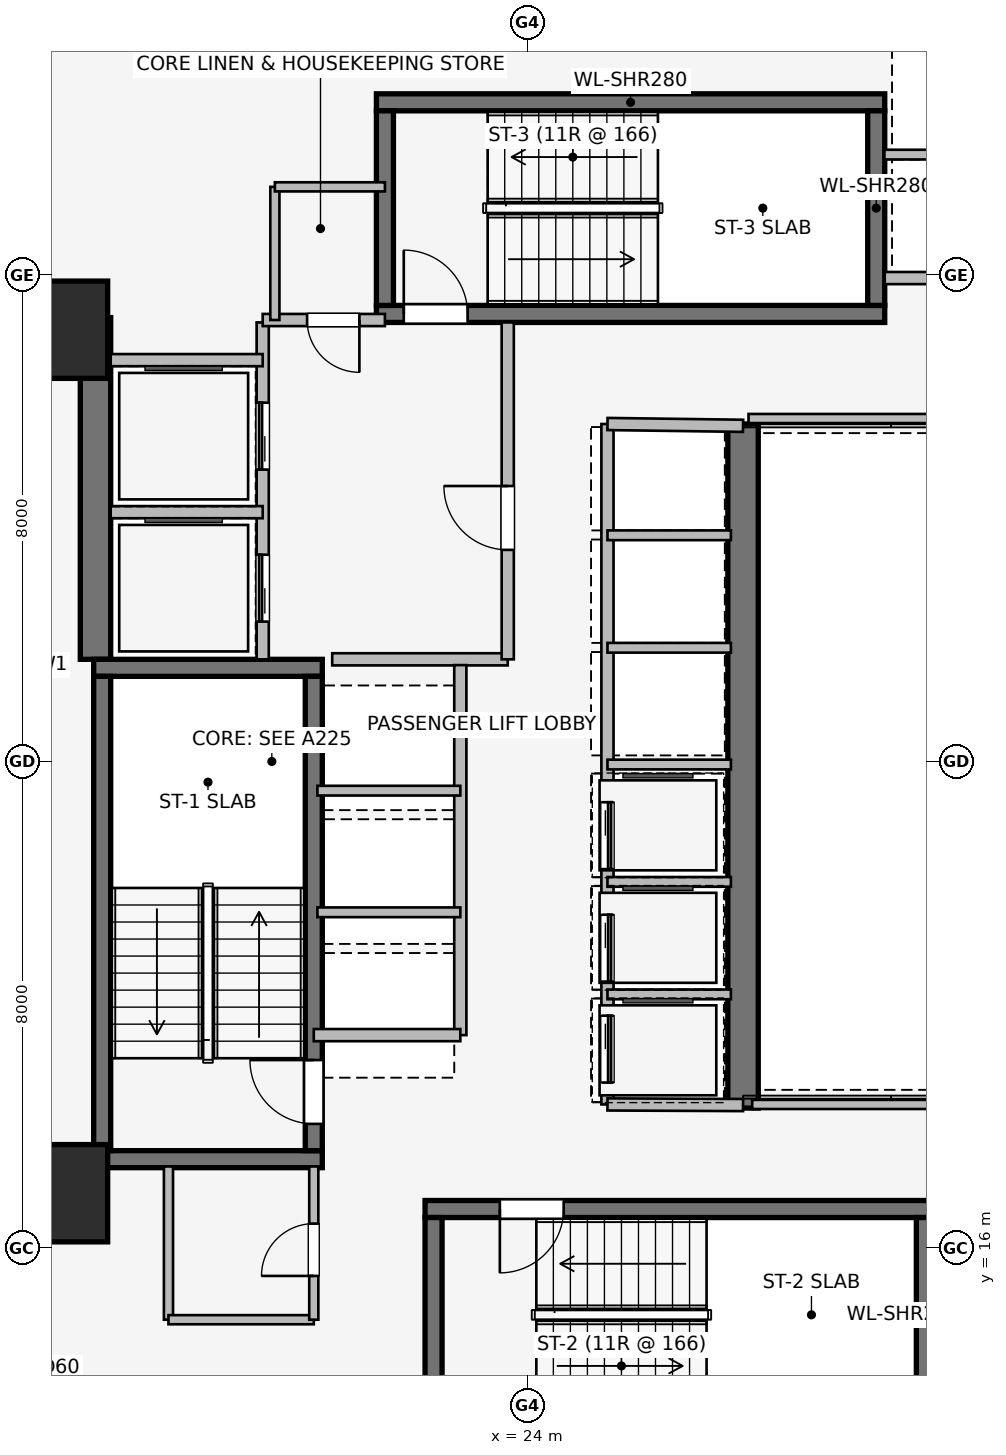
"""IFC4 building model, lengths in metres.
Left out: names, types, materials, properties, quantities, classifications, styles, units other than length and angle.
Written with IfcOpenShell. Run it as: python <this file> out.ifc"""

import sys

from ifc_helpers import new_model, si_unit, direction, frame, frame_2d, origin, origin_2d, place, context, subcontext, project, spatial, rectangle, extrude, element, fill, save


model = new_model("IFC4")
c1 = context("Model", 3, precision=1e-05, world=origin(), true_north=direction((0.0, 1.0)))
c2 = subcontext(c1, "Body", "Model", "MODEL_VIEW")
j1 = project(units=[si_unit("LENGTHUNIT", "METRE"), si_unit("PLANEANGLEUNIT", "RADIAN")], contexts=[c1])
p1 = place(None, origin())
s1 = spatial("IfcSite", under=j1, at=p1, CompositionType="ELEMENT")
p2 = place(p1, origin())
s2 = spatial("IfcBuilding", under=s1, at=p2, CompositionType="ELEMENT")
p3 = place(p2, frame((0.0, 0.0, 89.05)))
s3 = spatial("IfcBuildingStorey", under=s2, at=p3, CompositionType="ELEMENT", Elevation=89.05)
p4 = place(p3, frame((16.9, 25.68, 0.0), z_axis=(0.0, 0.0, 1.0), x_axis=(0.0, 1.0, 0.0)))
e1 = element("IfcWall", 1, at=p4, inside=s3, PredefinedType="SHEAR", context=c2, shape_type="SweptSolid", body=[
    extrude(rectangle(XDim=5.62, YDim=0.5, at=frame_2d((2.81, 0.0))), origin(), (0.0, 0.0, 1.0), 3.65),
])
p5 = place(p3, frame((27.55, 29.55, 0.0), z_axis=(0.0, 0.0, 1.0), x_axis=(0.0, -1.0, 0.0)))
e2 = element("IfcWall", 2, at=p5, inside=s3, PredefinedType="SHEAR", context=c2, shape_type="SweptSolid", body=[
    extrude(rectangle(XDim=11.25, YDim=0.5, at=frame_2d((5.625, 0.0))), origin(), (0.0, 0.0, 1.0), 3.65),
])
for number, where, z_axis, x_axis in (
    (3, (16.87, 17.46, 0.0), (0.0, 0.0, 1.0), (1.0, 0.0, 0.0)),
    (4, (20.63, 25.54, 0.0), (0.0, 0.0, 1.0), (-1.0, 0.0, 0.0)),
):
    element("IfcWall", number, at=place(p3, frame(where, z_axis=z_axis, x_axis=x_axis)), inside=s3, PredefinedType="SHEAR", context=c2, shape_type="SweptSolid", body=[
        extrude(rectangle(XDim=3.76, YDim=0.28, at=frame_2d((1.88, 0.0))), origin(), (0.0, 0.0, 1.0), 3.65),
    ])
p6 = place(p3, frame((17.01, 25.4, 0.0), z_axis=(0.0, 0.0, 1.0), x_axis=(0.0, -1.0, 0.0)))
e5 = element("IfcWall", 5, at=p6, inside=s3, PredefinedType="SHEAR", context=c2, shape_type="SweptSolid", body=[
    extrude(rectangle(XDim=7.8, YDim=0.28, at=frame_2d((3.9, 0.0))), origin(), (0.0, 0.0, 1.0), 3.65),
])
p7 = place(p3, frame((20.49, 17.6, 0.0), z_axis=(0.0, 0.0, 1.0), x_axis=(0.0, 1.0, 0.0)))
e6 = element("IfcWall", 6, at=p7, inside=s3, PredefinedType="SHEAR", context=c2, shape_type="SweptSolid", body=[
    extrude(rectangle(XDim=7.8, YDim=0.28, at=frame_2d((3.9, 0.0))), origin(), (0.0, 0.0, 1.0), 3.65),
])
p8 = place(p7, frame((0.44, 0.0, 0.0)))
e7 = element("IfcOpeningElement", 7, at=p8, cuts=e6, PredefinedType="OPENING", context=c2, shape_type="SweptSolid", body=[
    extrude(rectangle(XDim=1.05, YDim=2.0, at=frame_2d((0.525, 1.0))), frame((0.0, 0.15, 0.0), z_axis=(0.0, -1.0, 0.0), x_axis=(1.0, 0.0, 0.0)), (0.0, 0.0, 1.0), 0.3),
])
p9 = place(p3, frame((30.68, 16.64, 0.0), z_axis=(0.0, 0.0, 1.0), x_axis=(-1.0, 0.0, 0.0)))
e8 = element("IfcWall", 8, at=p9, inside=s3, PredefinedType="SHEAR", context=c2, shape_type="SweptSolid", body=[
    extrude(rectangle(XDim=8.36, YDim=0.28, at=frame_2d((4.18, 0.0))), origin(), (0.0, 0.0, 1.0), 3.65),
])
p10 = place(p9, frame((6.08, 0.0, 0.0)))
e9 = element("IfcOpeningElement", 9, at=p10, cuts=e8, PredefinedType="OPENING", context=c2, shape_type="SweptSolid", body=[
    extrude(rectangle(XDim=1.05, YDim=2.0, at=frame_2d((0.525, 1.0))), frame((0.0, 0.15, 0.0), z_axis=(0.0, -1.0, 0.0), x_axis=(1.0, 0.0, 0.0)), (0.0, 0.0, 1.0), 0.3),
])
for number, where, z_axis, x_axis in (
    (10, (22.46, 16.5, 0.0), (0.0, 0.0, 1.0), (0.0, -1.0, 0.0)),
    (11, (30.54, 13.3, 0.0), (0.0, 0.0, 1.0), (0.0, 1.0, 0.0)),
):
    element("IfcWall", number, at=place(p3, frame(where, z_axis=z_axis, x_axis=x_axis)), inside=s3, PredefinedType="SHEAR", context=c2, shape_type="SweptSolid", body=[
        extrude(rectangle(XDim=3.2, YDim=0.28, at=frame_2d((1.6, 0.0))), origin(), (0.0, 0.0, 1.0), 3.65),
    ])
p11 = place(p3, frame((21.52, 31.36, 0.0), z_axis=(0.0, 0.0, 1.0), x_axis=(1.0, 0.0, 0.0)))
e12 = element("IfcWall", 12, at=p11, inside=s3, PredefinedType="SHEAR", context=c2, shape_type="SweptSolid", body=[
    extrude(rectangle(XDim=8.36, YDim=0.28, at=frame_2d((4.18, 0.0))), origin(), (0.0, 0.0, 1.0), 3.65),
])
p12 = place(p11, frame((0.45, 0.0, 0.0)))
e13 = element("IfcOpeningElement", 13, at=p12, cuts=e12, PredefinedType="OPENING", context=c2, shape_type="SweptSolid", body=[
    extrude(rectangle(XDim=1.05, YDim=2.0, at=frame_2d((0.525, 1.0))), frame((0.0, 0.15, 0.0), z_axis=(0.0, -1.0, 0.0), x_axis=(1.0, 0.0, 0.0)), (0.0, 0.0, 1.0), 0.3),
])
p13 = place(p3, frame((29.88, 34.84, 0.0), z_axis=(0.0, 0.0, 1.0), x_axis=(-1.0, 0.0, 0.0)))
e14 = element("IfcWall", 14, at=p13, inside=s3, PredefinedType="SHEAR", context=c2, shape_type="SweptSolid", body=[
    extrude(rectangle(XDim=8.36, YDim=0.28, at=frame_2d((4.18, 0.0))), origin(), (0.0, 0.0, 1.0), 3.65),
])
for number, where, z_axis, x_axis in (
    (15, (21.66, 34.7, 0.0), (0.0, 0.0, 1.0), (0.0, -1.0, 0.0)),
    (16, (29.74, 31.5, 0.0), (0.0, 0.0, 1.0), (0.0, 1.0, 0.0)),
):
    element("IfcWall", number, at=place(p3, frame(where, z_axis=z_axis, x_axis=x_axis)), inside=s3, PredefinedType="SHEAR", context=c2, shape_type="SweptSolid", body=[
        extrude(rectangle(XDim=3.2, YDim=0.28, at=frame_2d((1.6, 0.0))), origin(), (0.0, 0.0, 1.0), 3.65),
    ])
for number, where, z_axis, x_axis in (
    (17, (16.3, 16.9, 0.0), (0.0, 0.0, 1.0), (1.0, 0.0, 0.0)),
    (18, (16.3, 31.1, 0.0), (0.0, 0.0, 1.0), (1.0, 0.0, 0.0)),
):
    element("IfcColumn", number, at=place(p3, frame(where, z_axis=z_axis, x_axis=x_axis)), inside=s3, PredefinedType="COLUMN", context=c2, shape_type="SweptSolid", body=[
        extrude(rectangle(XDim=1.6, YDim=1.6, at=origin_2d()), origin(), (0.0, 0.0, 1.0), 3.65),
    ])
p14 = place(p3, frame((19.65, 25.68, 0.0), z_axis=(0.0, 0.0, 1.0), x_axis=(0.0, 1.0, 0.0)))
e19 = element("IfcWall", 19, at=p14, inside=s3, PredefinedType="PARTITIONING", context=c2, shape_type="SweptSolid", body=[
    extrude(rectangle(XDim=5.54, YDim=0.2, at=frame_2d((2.77, 0.0))), origin(), (0.0, 0.0, 1.0), 3.39),
])
p15 = place(p14, frame((0.62, 0.0, 0.0)))
e20 = element("IfcOpeningElement", 20, at=p15, cuts=e19, PredefinedType="OPENING", context=c2, shape_type="SweptSolid", body=[
    extrude(rectangle(XDim=1.1, YDim=2.2, at=frame_2d((0.55, 1.1))), frame((0.0, 0.11, 0.0), z_axis=(0.0, -1.0, 0.0), x_axis=(1.0, 0.0, 0.0)), (0.0, 0.0, 1.0), 0.22),
])
p16 = place(p14, frame((3.12, 0.0, 0.0)))
e21 = element("IfcOpeningElement", 21, at=p16, cuts=e19, PredefinedType="OPENING", context=c2, shape_type="SweptSolid", body=[
    extrude(rectangle(XDim=1.1, YDim=2.2, at=frame_2d((0.55, 1.1))), frame((0.0, 0.11, 0.0), z_axis=(0.0, -1.0, 0.0), x_axis=(1.0, 0.0, 0.0)), (0.0, 0.0, 1.0), 0.22),
])
p17 = place(p3, frame((20.793, 25.68, 0.0), z_axis=(0.0, 0.0, 1.0), x_axis=(1.0, 0.0, 0.0)))
e22 = element("IfcWall", 22, at=p17, inside=s3, PredefinedType="PARTITIONING", context=c2, shape_type="SweptSolid", body=[
    extrude(rectangle(XDim=2.887, YDim=0.2, at=frame_2d((1.443, 0.0))), origin(), (0.0, 0.0, 1.0), 3.39),
])
p18 = place(p3, frame((23.68, 25.68, 0.0), z_axis=(0.0, 0.0, 1.0), x_axis=(0.0, 1.0, 0.0)))
e23 = element("IfcWall", 23, at=p18, inside=s3, PredefinedType="PARTITIONING", context=c2, shape_type="SweptSolid", body=[
    extrude(rectangle(XDim=5.54, YDim=0.2, at=frame_2d((2.77, 0.0))), origin(), (0.0, 0.0, 1.0), 3.39),
])
p19 = place(p18, frame((1.8, 0.0, 0.0)))
e24 = element("IfcOpeningElement", 24, at=p19, cuts=e23, PredefinedType="OPENING", context=c2, shape_type="SweptSolid", body=[
    extrude(rectangle(XDim=1.05, YDim=2.0, at=frame_2d((0.525, 1.0))), frame((0.0, 0.11, 0.0), z_axis=(0.0, -1.0, 0.0), x_axis=(1.0, 0.0, 0.0)), (0.0, 0.0, 1.0), 0.22),
])
p20 = place(p3, frame((21.66, 31.26, 0.0), z_axis=(0.0, 0.0, 1.0), x_axis=(-1.0, 0.0, 0.0)))
e25 = element("IfcWall", 25, at=p20, inside=s3, PredefinedType="PARTITIONING", context=c2, shape_type="SweptSolid", body=[
    extrude(rectangle(XDim=2.01, YDim=0.2, at=frame_2d((1.005, 0.0))), origin(), (0.0, 0.0, 1.0), 3.39),
])
p21 = place(p20, frame((0.42, 0.0, 0.0)))
e26 = element("IfcOpeningElement", 26, at=p21, cuts=e25, PredefinedType="OPENING", context=c2, shape_type="SweptSolid", body=[
    extrude(rectangle(XDim=0.86, YDim=2.0, at=frame_2d((0.43, 1.0))), frame((0.0, 0.11, 0.0), z_axis=(0.0, -1.0, 0.0), x_axis=(1.0, 0.0, 0.0)), (0.0, 0.0, 1.0), 0.22),
])
p22 = place(p3, frame((17.15, 28.1, 0.0), z_axis=(0.0, 0.0, 1.0), x_axis=(1.0, 0.0, 0.0)))
e27 = element("IfcWall", 27, at=p22, inside=s3, PredefinedType="PARTITIONING", context=c2, shape_type="SweptSolid", body=[
    extrude(rectangle(XDim=2.5, YDim=0.2, at=frame_2d((1.25, 0.0))), origin(), (0.0, 0.0, 1.0), 3.39),
])
p23 = place(p3, frame((19.65, 30.6, 0.0), z_axis=(0.0, 0.0, 1.0), x_axis=(-1.0, 0.0, 0.0)))
e28 = element("IfcWall", 28, at=p23, inside=s3, PredefinedType="PARTITIONING", context=c2, shape_type="SweptSolid", body=[
    extrude(rectangle(XDim=2.5, YDim=0.2, at=frame_2d((1.25, 0.0))), origin(), (0.0, 0.0, 1.0), 2.29),
])
p24 = place(p3, frame((32.48, 31.95, 0.0), z_axis=(0.0, 0.0, 1.0), x_axis=(-1.0, 0.0, 0.0)))
e29 = element("IfcWall", 29, at=p24, inside=s3, PredefinedType="PARTITIONING", context=c2, shape_type="SweptSolid", body=[
    extrude(rectangle(XDim=2.6, YDim=0.2, at=frame_2d((1.3, 0.0))), origin(), (0.0, 0.0, 1.0), 3.39),
])
p25 = place(p3, frame((29.875, 33.98, 0.0), z_axis=(0.0, 0.0, 1.0), x_axis=(1.0, 0.0, 0.0)))
e30 = element("IfcWall", 30, at=p25, inside=s3, PredefinedType="PARTITIONING", context=c2, shape_type="SweptSolid", body=[
    extrude(rectangle(XDim=2.605, YDim=0.16, at=frame_2d((1.302, 0.0))), origin(), (0.0, 0.0, 1.0), 3.39),
])
p26 = place(p3, frame((22.9, 19.5, 0.0), z_axis=(0.0, 0.0, 1.0), x_axis=(0.0, 1.0, 0.0)))
e31 = element("IfcWall", 31, at=p26, inside=s3, PredefinedType="PARTITIONING", context=c2, shape_type="SweptSolid", body=[
    extrude(rectangle(XDim=6.085, YDim=0.2, at=frame_2d((3.042, 0.0))), origin(), (0.0, 0.0, 1.0), 3.39),
])
p27 = place(p3, frame((20.49, 19.5, 0.0), z_axis=(0.0, 0.0, 1.0), x_axis=(1.0, 0.0, 0.0)))
e32 = element("IfcWall", 32, at=p27, inside=s3, PredefinedType="PARTITIONING", context=c2, shape_type="SweptSolid", body=[
    extrude(rectangle(XDim=2.41, YDim=0.2, at=frame_2d((1.205, 0.0))), origin(), (0.0, 0.0, 1.0), 2.29),
])
for number, where, z_axis, x_axis in (
    (33, (20.55, 21.52, 0.0), (0.0, 0.0, 1.0), (1.0, 0.0, 0.0)),
    (34, (20.55, 23.52, 0.0), (0.0, 0.0, 1.0), (1.0, 0.0, 0.0)),
):
    element("IfcWall", number, at=place(p3, frame(where, z_axis=z_axis, x_axis=x_axis)), inside=s3, PredefinedType="PARTITIONING", context=c2, shape_type="SweptSolid", body=[
        extrude(rectangle(XDim=2.35, YDim=0.16, at=frame_2d((1.175, 0.0))), origin(), (0.0, 0.0, 1.0), 3.39),
    ])
p28 = place(p3, frame((25.32, 29.55, 0.0), z_axis=(0.0, 0.0, 1.0), x_axis=(0.0, -1.0, 0.0)))
e35 = element("IfcWall", 35, at=p28, inside=s3, PredefinedType="PARTITIONING", context=c2, shape_type="SweptSolid", body=[
    extrude(rectangle(XDim=11.19, YDim=0.2, at=frame_2d((5.595, 0.0))), origin(), (0.0, 0.0, 1.0), 3.39),
])
p29 = place(p28, frame((6.22, 0.0, 0.0)))
e36 = element("IfcOpeningElement", 36, at=p29, cuts=e35, PredefinedType="OPENING", context=c2, shape_type="SweptSolid", body=[
    extrude(rectangle(XDim=1.1, YDim=2.2, at=frame_2d((0.55, 1.1))), frame((0.0, 0.11, 0.0), z_axis=(0.0, -1.0, 0.0), x_axis=(1.0, 0.0, 0.0)), (0.0, 0.0, 1.0), 0.22),
])
p30 = place(p28, frame((8.07, 0.0, 0.0)))
e37 = element("IfcOpeningElement", 37, at=p30, cuts=e35, PredefinedType="OPENING", context=c2, shape_type="SweptSolid", body=[
    extrude(rectangle(XDim=1.1, YDim=2.2, at=frame_2d((0.55, 1.1))), frame((0.0, 0.11, 0.0), z_axis=(0.0, -1.0, 0.0), x_axis=(1.0, 0.0, 0.0)), (0.0, 0.0, 1.0), 0.22),
])
p31 = place(p28, frame((9.73, 0.0, 0.0)))
e38 = element("IfcOpeningElement", 38, at=p31, cuts=e35, PredefinedType="OPENING", context=c2, shape_type="SweptSolid", body=[
    extrude(rectangle(XDim=1.1, YDim=2.2, at=frame_2d((0.55, 1.1))), frame((0.0, 0.11, 0.0), z_axis=(0.0, -1.0, 0.0), x_axis=(1.0, 0.0, 0.0)), (0.0, 0.0, 1.0), 0.22),
])
p32 = place(p3, frame((25.32, 18.36, 0.0), z_axis=(0.0, 0.0, 1.0), x_axis=(0.999989925833, -0.004488678231, 0.0)))
e39 = element("IfcWall", 39, at=p32, inside=s3, PredefinedType="PARTITIONING", context=c2, shape_type="SweptSolid", body=[
    extrude(rectangle(XDim=2.23, YDim=0.2, at=frame_2d((1.115, 0.0))), origin(), (0.0, 0.0, 1.0), 3.39),
])
p33 = place(p3, frame((27.55, 29.52, 0.0), z_axis=(0.0, 0.0, 1.0), x_axis=(-0.999909343457, 0.013464949556, 0.0)))
e40 = element("IfcWall", 40, at=p33, inside=s3, PredefinedType="PARTITIONING", context=c2, shape_type="SweptSolid", body=[
    extrude(rectangle(XDim=2.23, YDim=0.2, at=frame_2d((1.115, 0.0))), origin(), (0.0, 0.0, 1.0), 2.29),
])
for number, where, z_axis, x_axis in (
    (41, (25.32, 20.17, 0.0), (0.0, 0.0, 1.0), (1.0, 0.0, 0.0)),
    (42, (25.32, 22.02, 0.0), (0.0, 0.0, 1.0), (1.0, 0.0, 0.0)),
    (43, (25.32, 23.95, 0.0), (0.0, 0.0, 1.0), (1.0, 0.0, 0.0)),
    (44, (25.32, 25.87, 0.0), (0.0, 0.0, 1.0), (1.0, 0.0, 0.0)),
    (45, (25.32, 27.72, 0.0), (0.0, 0.0, 1.0), (1.0, 0.0, 0.0)),
):
    element("IfcWall", number, at=place(p3, frame(where, z_axis=z_axis, x_axis=x_axis)), inside=s3, PredefinedType="PARTITIONING", context=c2, shape_type="SweptSolid", body=[
        extrude(rectangle(XDim=2.03, YDim=0.16, at=frame_2d((1.015, 0.0))), origin(), (0.0, 0.0, 1.0), 3.39),
    ])
p34 = place(p3, frame((18.1, 17.34, 0.0), z_axis=(0.0, 0.0, 1.0), x_axis=(0.0, -1.0, 0.0)))
e46 = element("IfcWall", 46, at=p34, inside=s3, PredefinedType="PARTITIONING", context=c2, shape_type="SweptSolid", body=[
    extrude(rectangle(XDim=2.52, YDim=0.15, at=frame_2d((1.26, 0.0))), origin(), (0.0, 0.0, 1.0), 3.39),
])
p35 = place(p3, frame((18.1, 14.82, 0.0), z_axis=(0.0, 0.0, 1.0), x_axis=(1.0, 0.0, 0.0)))
e47 = element("IfcWall", 47, at=p35, inside=s3, PredefinedType="PARTITIONING", context=c2, shape_type="SweptSolid", body=[
    extrude(rectangle(XDim=2.39, YDim=0.15, at=frame_2d((1.195, 0.0))), origin(), (0.0, 0.0, 1.0), 3.39),
])
p36 = place(p3, frame((20.49, 14.82, 0.0), z_axis=(0.0, 0.0, 1.0), x_axis=(0.0, 1.0, 0.0)))
e48 = element("IfcWall", 48, at=p36, inside=s3, PredefinedType="PARTITIONING", context=c2, shape_type="SweptSolid", body=[
    extrude(rectangle(XDim=2.52, YDim=0.15, at=frame_2d((1.26, 0.0))), origin(), (0.0, 0.0, 1.0), 3.39),
])
p37 = place(p36, frame((0.72, 0.0, 0.0)))
e49 = element("IfcOpeningElement", 49, at=p37, cuts=e48, PredefinedType="OPENING", context=c2, shape_type="SweptSolid", body=[
    extrude(rectangle(XDim=0.86, YDim=2.0, at=frame_2d((0.43, 1.0))), frame((0.0, 0.085, 0.0), z_axis=(0.0, -1.0, 0.0), x_axis=(1.0, 0.0, 0.0)), (0.0, 0.0, 1.0), 0.17),
])
p38 = place(p3, frame((19.85, 33.45, 0.0), z_axis=(0.0, 0.0, 1.0), x_axis=(0.0, -1.0, 0.0)))
e50 = element("IfcWall", 50, at=p38, inside=s3, PredefinedType="PARTITIONING", context=c2, shape_type="SweptSolid", body=[
    extrude(rectangle(XDim=2.19, YDim=0.15, at=frame_2d((1.095, 0.0))), origin(), (0.0, 0.0, 1.0), 3.39),
])
p39 = place(p3, frame((21.66, 33.45, 0.0), z_axis=(0.0, 0.0, 1.0), x_axis=(-1.0, 0.0, 0.0)))
e51 = element("IfcWall", 51, at=p39, inside=s3, PredefinedType="PARTITIONING", context=c2, shape_type="SweptSolid", body=[
    extrude(rectangle(XDim=1.81, YDim=0.15, at=frame_2d((0.905, 0.0))), origin(), (0.0, 0.0, 1.0), 3.39),
])
p40 = place(p3, frame((27.7, 18.36, 0.0), z_axis=(0.0, 0.0, 1.0), x_axis=(1.0, 0.0, 0.0)))
e52 = element("IfcWall", 52, at=p40, inside=s3, PredefinedType="PARTITIONING", context=c2, shape_type="SweptSolid", body=[
    extrude(rectangle(XDim=12.14, YDim=0.15, at=frame_2d((6.07, 0.0))), origin(), (0.0, 0.0, 1.0), 2.531),
])
p41 = place(p3, frame((39.84, 29.64, 0.0), z_axis=(0.0, 0.0, 1.0), x_axis=(-1.0, 0.0, 0.0)))
e53 = element("IfcWall", 53, at=p41, inside=s3, PredefinedType="PARTITIONING", context=c2, shape_type="SweptSolid", body=[
    extrude(rectangle(XDim=12.2, YDim=0.15, at=frame_2d((6.1, 0.0))), origin(), (0.0, 0.0, 1.0), 2.531),
])
p42 = place(p8, origin())
e54 = element("IfcDoor", 54, at=p42, inside=s3, OperationType="SINGLE_SWING_RIGHT", PredefinedType="DOOR", context=c2, shape_type="SweptSolid", body=[
    extrude(rectangle(XDim=1.05, YDim=2.0, at=frame_2d((0.525, 1.0))), frame((0.0, 0.025, 0.0), z_axis=(0.0, -1.0, 0.0), x_axis=(1.0, 0.0, 0.0)), (0.0, 0.0, 1.0), 0.05),
])
fill(e7, e54)
p43 = place(p10, origin())
e55 = element("IfcDoor", 55, at=p43, inside=s3, OperationType="SINGLE_SWING_RIGHT", PredefinedType="DOOR", context=c2, shape_type="SweptSolid", body=[
    extrude(rectangle(XDim=1.05, YDim=2.0, at=frame_2d((0.525, 1.0))), frame((0.0, 0.025, 0.0), z_axis=(0.0, -1.0, 0.0), x_axis=(1.0, 0.0, 0.0)), (0.0, 0.0, 1.0), 0.05),
])
fill(e9, e55)
p44 = place(p12, origin())
e56 = element("IfcDoor", 56, at=p44, inside=s3, OperationType="SINGLE_SWING_LEFT", PredefinedType="DOOR", context=c2, shape_type="SweptSolid", body=[
    extrude(rectangle(XDim=1.05, YDim=2.0, at=frame_2d((0.525, 1.0))), frame((0.0, 0.025, 0.0), z_axis=(0.0, -1.0, 0.0), x_axis=(1.0, 0.0, 0.0)), (0.0, 0.0, 1.0), 0.05),
])
fill(e13, e56)
p45 = place(p15, origin())
e57 = element("IfcDoor", 57, at=p45, inside=s3, OperationType="SLIDING_TO_LEFT", PredefinedType="DOOR", context=c2, shape_type="SweptSolid", body=[
    extrude(rectangle(XDim=1.1, YDim=2.2, at=frame_2d((0.55, 1.1))), frame((0.0, 0.025, 0.0), z_axis=(0.0, -1.0, 0.0), x_axis=(1.0, 0.0, 0.0)), (0.0, 0.0, 1.0), 0.05),
])
fill(e20, e57)
p46 = place(p16, origin())
e58 = element("IfcDoor", 58, at=p46, inside=s3, OperationType="SLIDING_TO_LEFT", PredefinedType="DOOR", context=c2, shape_type="SweptSolid", body=[
    extrude(rectangle(XDim=1.1, YDim=2.2, at=frame_2d((0.55, 1.1))), frame((0.0, 0.025, 0.0), z_axis=(0.0, -1.0, 0.0), x_axis=(1.0, 0.0, 0.0)), (0.0, 0.0, 1.0), 0.05),
])
fill(e21, e58)
p47 = place(p19, origin())
e59 = element("IfcDoor", 59, at=p47, inside=s3, OperationType="SINGLE_SWING_RIGHT", PredefinedType="DOOR", context=c2, shape_type="SweptSolid", body=[
    extrude(rectangle(XDim=1.05, YDim=2.0, at=frame_2d((0.525, 1.0))), frame((0.0, 0.025, 0.0), z_axis=(0.0, -1.0, 0.0), x_axis=(1.0, 0.0, 0.0)), (0.0, 0.0, 1.0), 0.05),
])
fill(e24, e59)
p48 = place(p21, origin())
e60 = element("IfcDoor", 60, at=p48, inside=s3, OperationType="SINGLE_SWING_LEFT", PredefinedType="DOOR", context=c2, shape_type="SweptSolid", body=[
    extrude(rectangle(XDim=0.86, YDim=2.0, at=frame_2d((0.43, 1.0))), frame((0.0, 0.025, 0.0), z_axis=(0.0, -1.0, 0.0), x_axis=(1.0, 0.0, 0.0)), (0.0, 0.0, 1.0), 0.05),
])
fill(e26, e60)
p49 = place(p29, origin())
e61 = element("IfcDoor", 61, at=p49, inside=s3, OperationType="SLIDING_TO_LEFT", PredefinedType="DOOR", context=c2, shape_type="SweptSolid", body=[
    extrude(rectangle(XDim=1.1, YDim=2.2, at=frame_2d((0.55, 1.1))), frame((0.0, 0.025, 0.0), z_axis=(0.0, -1.0, 0.0), x_axis=(1.0, 0.0, 0.0)), (0.0, 0.0, 1.0), 0.05),
])
fill(e36, e61)
p50 = place(p30, origin())
e62 = element("IfcDoor", 62, at=p50, inside=s3, OperationType="SLIDING_TO_LEFT", PredefinedType="DOOR", context=c2, shape_type="SweptSolid", body=[
    extrude(rectangle(XDim=1.1, YDim=2.2, at=frame_2d((0.55, 1.1))), frame((0.0, 0.025, 0.0), z_axis=(0.0, -1.0, 0.0), x_axis=(1.0, 0.0, 0.0)), (0.0, 0.0, 1.0), 0.05),
])
fill(e37, e62)
p51 = place(p31, origin())
e63 = element("IfcDoor", 63, at=p51, inside=s3, OperationType="SLIDING_TO_LEFT", PredefinedType="DOOR", context=c2, shape_type="SweptSolid", body=[
    extrude(rectangle(XDim=1.1, YDim=2.2, at=frame_2d((0.55, 1.1))), frame((0.0, 0.025, 0.0), z_axis=(0.0, -1.0, 0.0), x_axis=(1.0, 0.0, 0.0)), (0.0, 0.0, 1.0), 0.05),
])
fill(e38, e63)
p52 = place(p37, origin())
e64 = element("IfcDoor", 64, at=p52, inside=s3, OperationType="SINGLE_SWING_LEFT", PredefinedType="DOOR", context=c2, shape_type="SweptSolid", body=[
    extrude(rectangle(XDim=0.86, YDim=2.0, at=frame_2d((0.43, 1.0))), frame((0.0, 0.025, 0.0), z_axis=(0.0, -1.0, 0.0), x_axis=(1.0, 0.0, 0.0)), (0.0, 0.0, 1.0), 0.05),
])
fill(e49, e64)
save(model, sys.argv[1])
